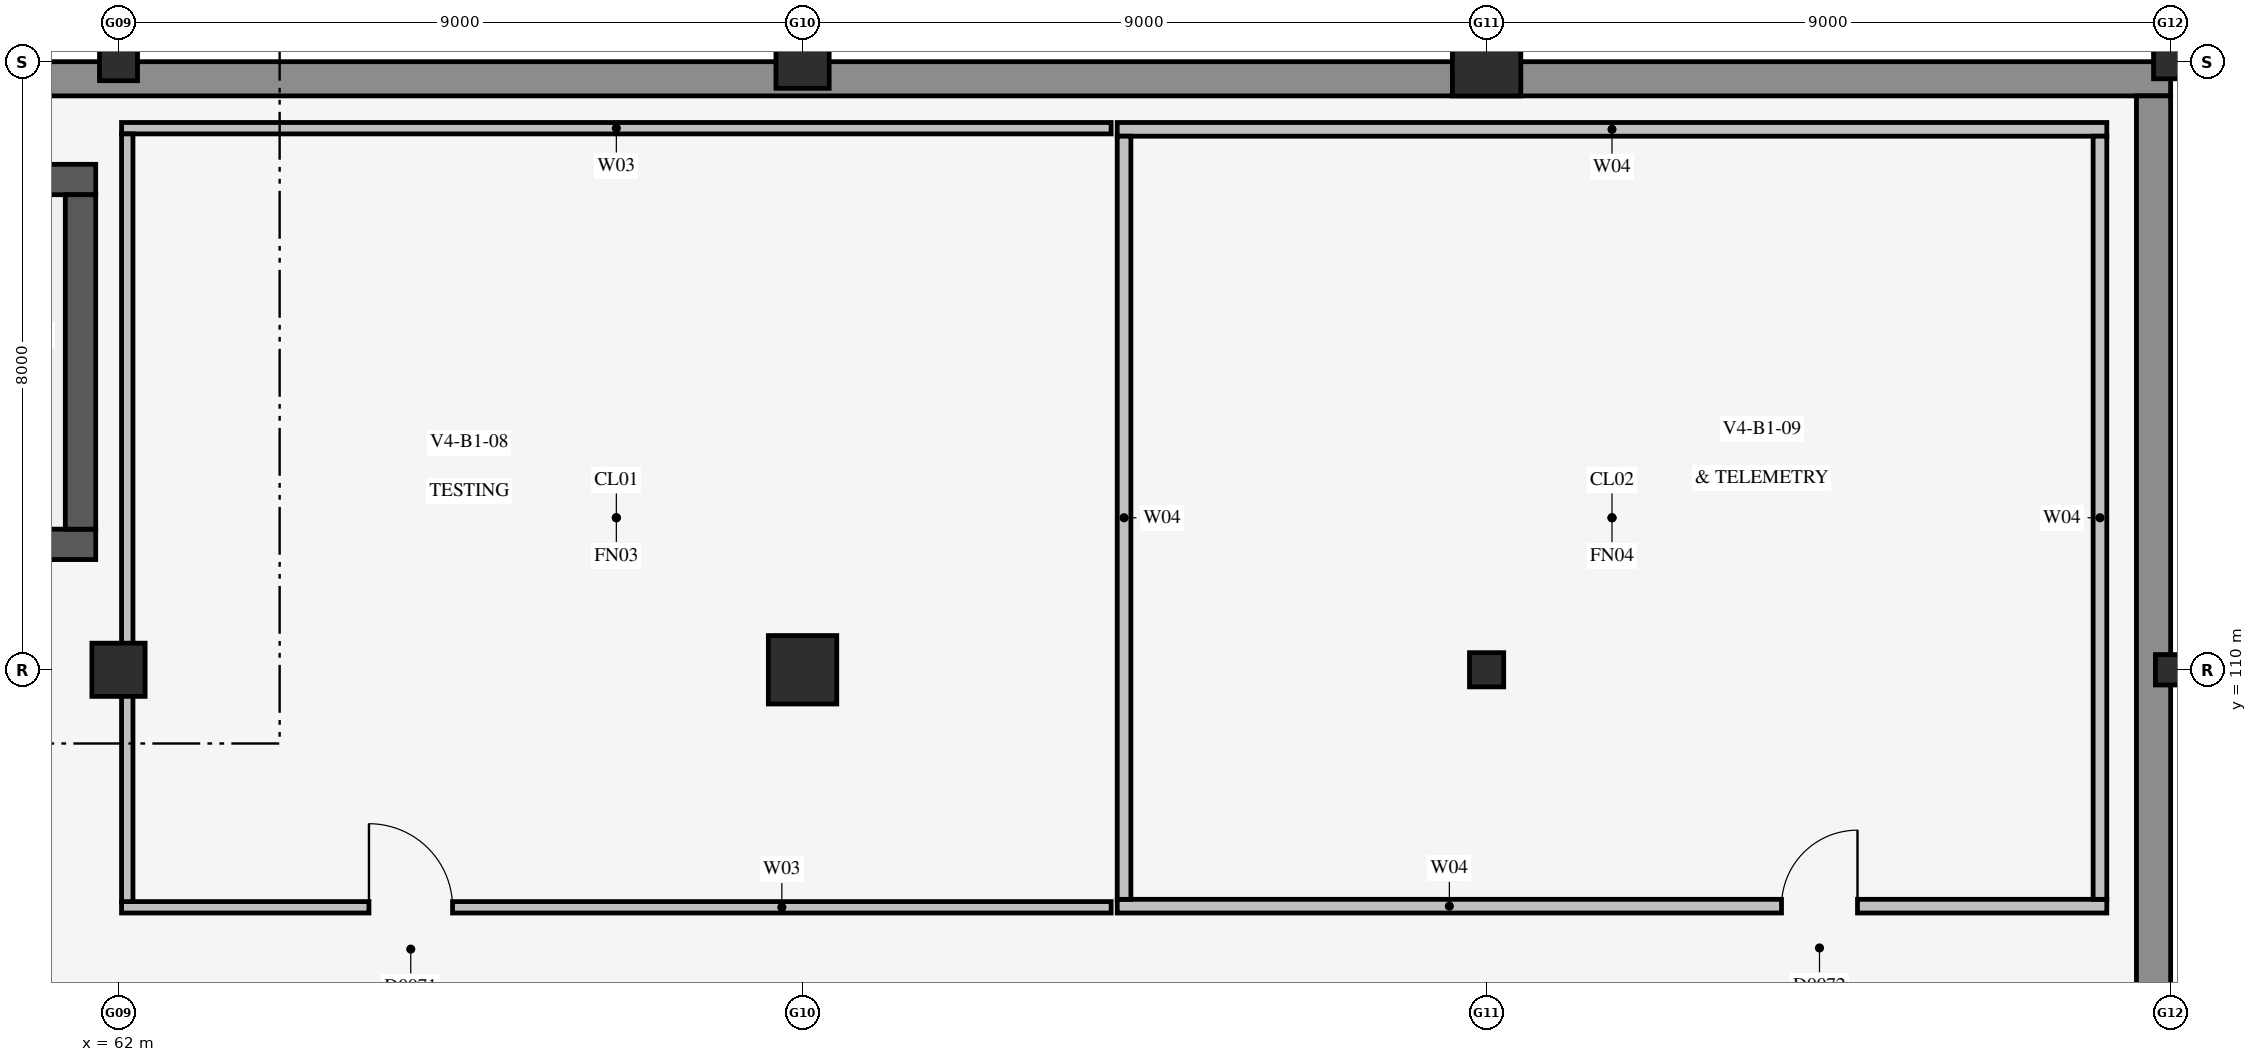
"""IFC4 building model, lengths in metres.
Left out: names, types, materials, properties, quantities, classifications, styles, units other than length and angle.
Written with IfcOpenShell. Run it as: python <this file> out.ifc"""

import sys

from ifc_helpers import new_model, si_unit, direction, frame, frame_2d, origin, origin_2d, place, context, subcontext, project, spatial, rectangle, circle, extrude, element, fill, save


model = new_model("IFC4")
c1 = context("Model", 3, precision=1e-05, world=origin(), true_north=direction((0.0, 1.0)))
c2 = subcontext(c1, "Body", "Model", "MODEL_VIEW")
j1 = project(units=[si_unit("LENGTHUNIT", "METRE"), si_unit("PLANEANGLEUNIT", "RADIAN")], contexts=[c1])
p1 = place(None, origin())
s1 = spatial("IfcSite", under=j1, at=p1, CompositionType="ELEMENT")
p2 = place(p1, origin())
s2 = spatial("IfcBuilding", under=s1, at=p2, CompositionType="ELEMENT")
p3 = place(p2, frame((0.0, 0.0, -5.2)))
s3 = spatial("IfcBuildingStorey", under=s2, at=p3, CompositionType="ELEMENT", Elevation=-5.2)
p4 = place(p3, frame((10.0, 117.775, 0.0), z_axis=(0.0, 0.0, 1.0), x_axis=(1.0, 0.0, 0.0)))
e1 = element("IfcWall", 1, at=p4, inside=s3, PredefinedType="USERDEFINED", context=c2, shape_type="SweptSolid", body=[
    extrude(rectangle(XDim=79.0, YDim=0.45, at=frame_2d((39.5, 0.0))), origin(), (0.0, 0.0, 1.0), 4.94),
])
p5 = place(p3, frame((88.775, 86.45, 0.0), z_axis=(0.0, 0.0, 1.0), x_axis=(0.0, 1.0, 0.0)))
e2 = element("IfcWall", 2, at=p5, inside=s3, PredefinedType="USERDEFINED", context=c2, shape_type="SweptSolid", body=[
    extrude(rectangle(XDim=31.1, YDim=0.45, at=frame_2d((15.55, 0.0))), origin(), (0.0, 0.0, 1.0), 4.94),
])
p6 = place(p3, frame((52.2, 111.65, 0.0), z_axis=(0.0, 0.0, 1.0), x_axis=(1.0, 0.0, 0.0)))
e3 = element("IfcWall", 3, at=p6, inside=s3, PredefinedType="SHEAR", context=c2, shape_type="SweptSolid", body=[
    extrude(rectangle(XDim=9.5, YDim=0.4, at=frame_2d((4.75, 0.0))), origin(), (0.0, 0.0, 1.0), 4.94),
])
p7 = place(p6, frame((0.48, 0.0, 0.0)))
e4 = element("IfcOpeningElement", 4, at=p7, cuts=e3, PredefinedType="OPENING", context=c2, shape_type="SweptSolid", body=[
    extrude(rectangle(XDim=1.5, YDim=2.3, at=frame_2d((0.75, 1.15))), frame((0.0, 0.212, 0.0), z_axis=(0.0, -1.0, 0.0), x_axis=(1.0, 0.0, 0.0)), (0.0, 0.0, 1.0), 0.424),
])
p8 = place(p3, frame((52.2, 116.45, 0.0), z_axis=(0.0, 0.0, 1.0), x_axis=(1.0, 0.0, 0.0)))
e5 = element("IfcWall", 5, at=p8, inside=s3, PredefinedType="SHEAR", context=c2, shape_type="SweptSolid", body=[
    extrude(rectangle(XDim=9.5, YDim=0.4, at=frame_2d((4.75, 0.0))), origin(), (0.0, 0.0, 1.0), 4.94),
])
p9 = place(p3, frame((61.5, 111.85, 0.0), z_axis=(0.0, 0.0, 1.0), x_axis=(0.0, 1.0, 0.0)))
e6 = element("IfcWall", 6, at=p9, inside=s3, PredefinedType="SHEAR", context=c2, shape_type="SweptSolid", body=[
    extrude(rectangle(XDim=4.4, YDim=0.4, at=frame_2d((2.2, 0.0))), origin(), (0.0, 0.0, 1.0), 4.94),
])
p10 = place(p3, frame((62.0, 110.0, 0.0), z_axis=(0.0, 0.0, 1.0), x_axis=(1.0, 0.0, 0.0)))
e7 = element("IfcColumn", 7, at=p10, inside=s3, PredefinedType="COLUMN", context=c2, shape_type="SweptSolid", body=[
    extrude(circle(Radius=0.35, at=origin_2d()), origin(), (0.0, 0.0, 1.0), 5.2),
])
p11 = place(p3, frame((62.0, 118.0, 0.0), z_axis=(0.0, 0.0, 1.0), x_axis=(1.0, 0.0, 0.0)))
e8 = element("IfcColumn", 8, at=p11, inside=s3, PredefinedType="COLUMN", context=c2, shape_type="SweptSolid", body=[
    extrude(circle(Radius=0.25, at=origin_2d()), origin(), (0.0, 0.0, 1.0), 5.2),
])
p12 = place(p3, frame((71.0, 110.0, 0.0), z_axis=(0.0, 0.0, 1.0), x_axis=(1.0, 0.0, 0.0)))
e9 = element("IfcColumn", 9, at=p12, inside=s3, PredefinedType="COLUMN", context=c2, shape_type="SweptSolid", body=[
    extrude(circle(Radius=0.45, at=origin_2d()), origin(), (0.0, 0.0, 1.0), 5.2),
])
p13 = place(p3, frame((71.0, 118.0, 0.0), z_axis=(0.0, 0.0, 1.0), x_axis=(1.0, 0.0, 0.0)))
e10 = element("IfcColumn", 10, at=p13, inside=s3, PredefinedType="COLUMN", context=c2, shape_type="SweptSolid", body=[
    extrude(circle(Radius=0.35, at=origin_2d()), origin(), (0.0, 0.0, 1.0), 5.2),
])
p14 = place(p3, frame((80.0, 110.0, 0.0), z_axis=(0.0, 0.0, 1.0), x_axis=(1.0, 0.0, 0.0)))
e11 = element("IfcColumn", 11, at=p14, inside=s3, PredefinedType="COLUMN", context=c2, shape_type="SweptSolid", body=[
    extrude(rectangle(XDim=0.45, YDim=0.45, at=origin_2d()), origin(), (0.0, 0.0, 1.0), 5.2),
])
p15 = place(p3, frame((80.0, 118.0, 0.0), z_axis=(0.0, 0.0, 1.0), x_axis=(1.0, 0.0, 0.0)))
e12 = element("IfcColumn", 12, at=p15, inside=s3, PredefinedType="COLUMN", context=c2, shape_type="SweptSolid", body=[
    extrude(circle(Radius=0.45, at=origin_2d()), origin(), (0.0, 0.0, 1.0), 5.2),
])
p16 = place(p3, frame((89.0, 110.0, 0.0), z_axis=(0.0, 0.0, 1.0), x_axis=(1.0, 0.0, 0.0)))
e13 = element("IfcColumn", 13, at=p16, inside=s3, PredefinedType="COLUMN", context=c2, shape_type="SweptSolid", body=[
    extrude(rectangle(XDim=0.4, YDim=0.4, at=origin_2d()), origin(), (0.0, 0.0, 1.0), 5.2),
])
p17 = place(p3, frame((89.0, 118.0, 0.0), z_axis=(0.0, 0.0, 1.0), x_axis=(1.0, 0.0, 0.0)))
e14 = element("IfcColumn", 14, at=p17, inside=s3, PredefinedType="COLUMN", context=c2, shape_type="SweptSolid", body=[
    extrude(rectangle(XDim=0.45, YDim=0.45, at=origin_2d()), origin(), (0.0, 0.0, 1.0), 5.2),
])
p18 = place(p3, frame((62.04, 106.875, 0.0), z_axis=(0.0, 0.0, 1.0), x_axis=(1.0, 0.0, 0.0)))
e15 = element("IfcWall", 15, at=p18, inside=s3, PredefinedType="PARTITIONING", context=c2, shape_type="SweptSolid", body=[
    extrude(rectangle(XDim=13.02, YDim=0.15, at=frame_2d((6.51, 0.0))), origin(), (0.0, 0.0, 1.0), 4.925),
])
p19 = place(p18, frame((3.255, 0.0, 0.0)))
e16 = element("IfcOpeningElement", 16, at=p19, cuts=e15, PredefinedType="OPENING", context=c2, shape_type="SweptSolid", body=[
    extrude(rectangle(XDim=1.1, YDim=2.25, at=frame_2d((0.55, 1.125))), frame((0.0, 0.087, 0.0), z_axis=(0.0, -1.0, 0.0), x_axis=(1.0, 0.0, 0.0)), (0.0, 0.0, 1.0), 0.174),
])
p20 = place(p3, frame((62.04, 117.125, 0.0), z_axis=(0.0, 0.0, 1.0), x_axis=(1.0, 0.0, 0.0)))
e17 = element("IfcWall", 17, at=p20, inside=s3, PredefinedType="PARTITIONING", context=c2, shape_type="SweptSolid", body=[
    extrude(rectangle(XDim=13.02, YDim=0.15, at=frame_2d((6.51, 0.0))), origin(), (0.0, 0.0, 1.0), 4.925),
])
p21 = place(p3, frame((62.115, 106.95, 0.0), z_axis=(0.0, 0.0, 1.0), x_axis=(0.0, 1.0, 0.0)))
e18 = element("IfcWall", 18, at=p21, inside=s3, PredefinedType="PARTITIONING", context=c2, shape_type="SweptSolid", body=[
    extrude(rectangle(XDim=10.1, YDim=0.15, at=frame_2d((5.05, 0.0))), origin(), (0.0, 0.0, 1.0), 3.66),
])
p22 = place(p3, frame((75.14, 106.89, 0.0), z_axis=(0.0, 0.0, 1.0), x_axis=(1.0, 0.0, 0.0)))
e19 = element("IfcWall", 19, at=p22, inside=s3, PredefinedType="PARTITIONING", context=c2, shape_type="SweptSolid", body=[
    extrude(rectangle(XDim=13.02, YDim=0.18, at=frame_2d((6.51, 0.0))), origin(), (0.0, 0.0, 1.0), 4.925),
])
p23 = place(p22, frame((8.74, 0.0, 0.0)))
e20 = element("IfcOpeningElement", 20, at=p23, cuts=e19, PredefinedType="OPENING", context=c2, shape_type="SweptSolid", body=[
    extrude(rectangle(XDim=1.0, YDim=2.2, at=frame_2d((0.5, 1.1))), frame((0.0, 0.102, 0.0), z_axis=(0.0, -1.0, 0.0), x_axis=(1.0, 0.0, 0.0)), (0.0, 0.0, 1.0), 0.204),
])
p24 = place(p3, frame((75.14, 117.11, 0.0), z_axis=(0.0, 0.0, 1.0), x_axis=(1.0, 0.0, 0.0)))
e21 = element("IfcWall", 21, at=p24, inside=s3, PredefinedType="PARTITIONING", context=c2, shape_type="SweptSolid", body=[
    extrude(rectangle(XDim=13.02, YDim=0.18, at=frame_2d((6.51, 0.0))), origin(), (0.0, 0.0, 1.0), 4.925),
])
for number, where, z_axis, x_axis in (
    (22, (88.07, 106.98, 0.0), (0.0, 0.0, 1.0), (0.0, 1.0, 0.0)),
    (23, (75.23, 106.98, 0.0), (0.0, 0.0, 1.0), (0.0, 1.0, 0.0)),
):
    element("IfcWall", number, at=place(p3, frame(where, z_axis=z_axis, x_axis=x_axis)), inside=s3, PredefinedType="PARTITIONING", context=c2, shape_type="SweptSolid", body=[
        extrude(rectangle(XDim=10.04, YDim=0.18, at=frame_2d((5.02, 0.0))), origin(), (0.0, 0.0, 1.0), 4.925),
    ])
p25 = place(p19, origin())
e24 = element("IfcDoor", 24, at=p25, inside=s3, OperationType="SINGLE_SWING_LEFT", PredefinedType="DOOR", context=c2, shape_type="SweptSolid", body=[
    extrude(rectangle(XDim=1.1, YDim=2.25, at=frame_2d((0.55, 1.125))), frame((0.0, 0.025, 0.0), z_axis=(0.0, -1.0, 0.0), x_axis=(1.0, 0.0, 0.0)), (0.0, 0.0, 1.0), 0.05),
])
fill(e16, e24)
p26 = place(p23, origin())
e25 = element("IfcDoor", 25, at=p26, inside=s3, OperationType="SINGLE_SWING_RIGHT", PredefinedType="DOOR", context=c2, shape_type="SweptSolid", body=[
    extrude(rectangle(XDim=1.0, YDim=2.2, at=frame_2d((0.5, 1.1))), frame((0.0, 0.025, 0.0), z_axis=(0.0, -1.0, 0.0), x_axis=(1.0, 0.0, 0.0)), (0.0, 0.0, 1.0), 0.05),
])
fill(e20, e25)
save(model, sys.argv[1])
